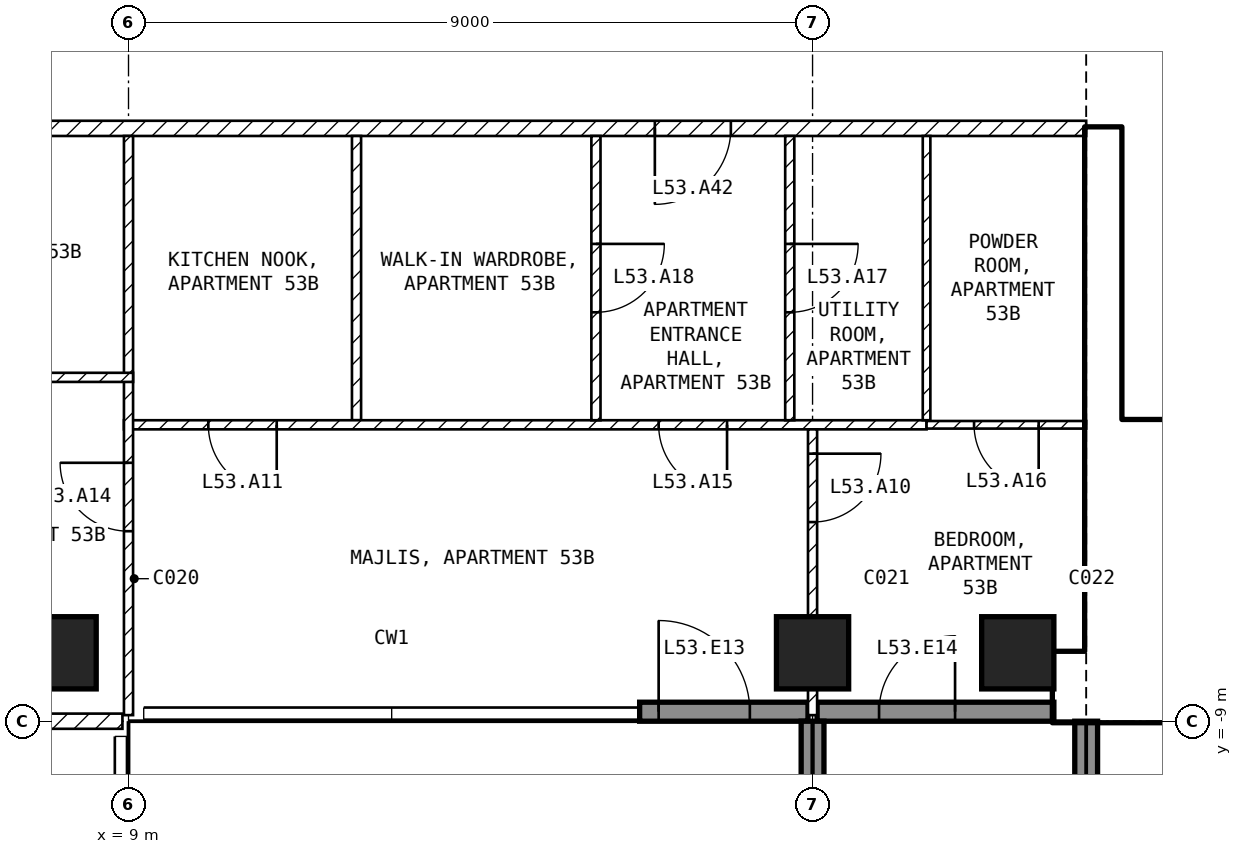
"""IFC4 building model, lengths in metres.
Left out: names, types, materials, properties, quantities, classifications, styles, units other than length and angle.
Written with IfcOpenShell. Run it as: python <this file> out.ifc"""

import sys

from ifc_helpers import new_model, si_unit, direction, frame, frame_2d, origin, origin_2d, place, context, subcontext, project, spatial, rectangle, extrude, element, fill, save


model = new_model("IFC4")
c1 = context("Model", 3, precision=1e-05, world=origin(), true_north=direction((0.0, 1.0)))
c2 = subcontext(c1, "Body", "Model", "MODEL_VIEW")
j1 = project(units=[si_unit("LENGTHUNIT", "METRE"), si_unit("PLANEANGLEUNIT", "RADIAN")], contexts=[c1])
p1 = place(None, origin())
s1 = spatial("IfcSite", under=j1, at=p1, CompositionType="ELEMENT")
p2 = place(p1, origin())
s2 = spatial("IfcBuilding", under=s1, at=p2, CompositionType="ELEMENT")
p3 = place(p2, frame((0.0, 0.0, 212.1)))
s3 = spatial("IfcBuildingStorey", under=s2, at=p3, CompositionType="ELEMENT", Elevation=212.1)
for number, where, z_axis, x_axis in (
    (1, (8.1, -8.1, -0.25), (0.0, 0.0, 1.0), (1.0, 0.0, 0.0)),
    (2, (18.0, -8.1, -0.25), (0.0, 0.0, 1.0), (1.0, 0.0, 0.0)),
    (3, (20.7, -8.1, -0.25), (0.0, 0.0, 1.0), (1.0, 0.0, 0.0)),
):
    element("IfcColumn", number, at=place(p3, frame(where, z_axis=z_axis, x_axis=x_axis)), inside=s3, PredefinedType="COLUMN", context=c2, shape_type="SweptSolid", body=[
        extrude(rectangle(XDim=0.95, YDim=0.95, at=origin_2d()), origin(), (0.0, 0.0, 1.0), 3.5),
    ])
p4 = place(p3, frame((15.725, -8.875, 0.0), z_axis=(0.0, 0.0, 1.0), x_axis=(1.0, 0.0, 0.0)))
e4 = element("IfcWall", 4, at=p4, inside=s3, PredefinedType="SOLIDWALL", context=c2, shape_type="SweptSolid", body=[
    extrude(rectangle(XDim=2.215, YDim=0.25, at=frame_2d((1.107, 0.0))), origin(), (0.0, 0.0, 1.0), 3.25),
])
p5 = place(p4, frame((0.25, 0.0, 0.0)))
e5 = element("IfcOpeningElement", 5, at=p5, cuts=e4, PredefinedType="OPENING", context=c2, shape_type="SweptSolid", body=[
    extrude(rectangle(XDim=1.2, YDim=2.4, at=frame_2d((0.6, 1.2))), frame((0.0, 0.135, 0.0), z_axis=(0.0, -1.0, 0.0), x_axis=(1.0, 0.0, 0.0)), (0.0, 0.0, 1.0), 0.27),
])
p6 = place(p3, frame((18.06, -8.875, 0.0), z_axis=(0.0, 0.0, 1.0), x_axis=(1.0, 0.0, 0.0)))
e6 = element("IfcWall", 6, at=p6, inside=s3, PredefinedType="SOLIDWALL", context=c2, shape_type="SweptSolid", body=[
    extrude(rectangle(XDim=3.115, YDim=0.25, at=frame_2d((1.558, 0.0))), origin(), (0.0, 0.0, 1.0), 3.25),
])
p7 = place(p6, frame((0.815, 0.0, 0.0)))
e7 = element("IfcOpeningElement", 7, at=p7, cuts=e6, PredefinedType="OPENING", context=c2, shape_type="SweptSolid", body=[
    extrude(rectangle(XDim=1.0, YDim=2.4, at=frame_2d((0.5, 1.2))), frame((0.0, 0.135, 0.0), z_axis=(0.0, -1.0, 0.0), x_axis=(1.0, 0.0, 0.0)), (0.0, 0.0, 1.0), 0.27),
])
for number, where, z_axis, x_axis in (
    (8, (18.0, -9.0, 0.0), (0.0, 0.0, 1.0), (0.0, -1.0, 0.0)),
    (9, (21.6, -9.0, 0.0), (0.0, 0.0, 1.0), (0.0, -1.0, 0.0)),
):
    element("IfcWall", number, at=place(p3, frame(where, z_axis=z_axis, x_axis=x_axis)), inside=s3, PredefinedType="SOLIDWALL", context=c2, shape_type="SweptSolid", body=[
        extrude(rectangle(XDim=2.7, YDim=0.3, at=frame_2d((1.35, 0.0))), origin(), (0.0, 0.0, 1.0), 3.25),
    ])
p8 = place(p3, frame((21.175, -8.55, 0.0), z_axis=(0.0, 0.0, 1.0), x_axis=(1.0, 0.0, 0.0)))
e10 = element("IfcWall", 10, at=p8, inside=s3, PredefinedType="SHEAR", context=c2, shape_type="SweptSolid", body=[
    extrude(rectangle(XDim=9.025, YDim=0.9, at=frame_2d((4.512, 0.0))), origin(), (0.0, 0.0, 1.0), 3.25),
])
p9 = place(p3, frame((21.825, -8.1, 0.0), z_axis=(0.0, 0.0, 1.0), x_axis=(0.0, 1.0, 0.0)))
e11 = element("IfcWall", 11, at=p9, inside=s3, PredefinedType="SHEAR", context=c2, shape_type="SweptSolid", body=[
    extrude(rectangle(XDim=6.9, YDim=0.45, at=frame_2d((3.45, 0.0))), origin(), (0.0, 0.0, 1.0), 3.25),
])
p10 = place(p3, frame((22.05, -5.15, 0.0), z_axis=(0.0, 0.0, 1.0), x_axis=(1.0, 0.0, 0.0)))
e12 = element("IfcWall", 12, at=p10, inside=s3, PredefinedType="SOLIDWALL", context=c2, shape_type="SweptSolid", body=[
    extrude(rectangle(XDim=6.3, YDim=0.2, at=frame_2d((3.15, 0.0))), origin(), (0.0, 0.0, 1.0), 3.25),
])
p11 = place(p10, frame((0.2, 0.0, 0.0)))
e13 = element("IfcOpeningElement", 13, at=p11, cuts=e12, PredefinedType="OPENING", context=c2, shape_type="SweptSolid", body=[
    extrude(rectangle(XDim=1.0, YDim=2.1, at=frame_2d((0.5, 1.05))), frame((0.0, 0.11, 0.0), z_axis=(0.0, -1.0, 0.0), x_axis=(1.0, 0.0, 0.0)), (0.0, 0.0, 1.0), 0.22),
])
p12 = place(p3, frame((21.6, -1.2, 0.0), z_axis=(0.0, 0.0, 1.0), x_axis=(-1.0, 0.0, 0.0)))
e14 = element("IfcWall", 14, at=p12, inside=s3, PredefinedType="PARTITIONING", context=c2, shape_type="SweptSolid", body=[
    extrude(rectangle(XDim=17.2, YDim=0.2, at=frame_2d((8.6, 0.0))), origin(), (0.0, 0.0, 1.0), 3.25),
])
p13 = place(p12, frame((4.675, 0.0, 0.0)))
e15 = element("IfcOpeningElement", 15, at=p13, cuts=e14, PredefinedType="OPENING", context=c2, shape_type="SweptSolid", body=[
    extrude(rectangle(XDim=1.0, YDim=2.1, at=frame_2d((0.5, 1.05))), frame((0.0, 0.11, 0.0), z_axis=(0.0, -1.0, 0.0), x_axis=(1.0, 0.0, 0.0)), (0.0, 0.0, 1.0), 0.22),
])
p14 = place(p3, frame((8.92, -9.0, 0.0), z_axis=(0.0, 0.0, 1.0), x_axis=(-1.0, 0.0, 0.0)))
e16 = element("IfcWall", 16, at=p14, inside=s3, PredefinedType="PARTITIONING", context=c2, shape_type="SweptSolid", body=[
    extrude(rectangle(XDim=17.84, YDim=0.2, at=frame_2d((8.92, 0.0))), origin(), (0.0, 0.0, 1.0), 3.25),
])
p15 = place(p14, frame((8.42, 0.0, 0.0)))
e17 = element("IfcOpeningElement", 17, at=p15, cuts=e16, PredefinedType="OPENING", context=c2, shape_type="SweptSolid", body=[
    extrude(rectangle(XDim=1.0, YDim=2.1, at=frame_2d((0.5, 1.05))), frame((0.0, 0.11, 0.0), z_axis=(0.0, -1.0, 0.0), x_axis=(1.0, 0.0, 0.0)), (0.0, 0.0, 1.0), 0.22),
])
p16 = place(p3, frame((12.0, -1.3, 0.0), z_axis=(0.0, 0.0, 1.0), x_axis=(0.0, -1.0, 0.0)))
e18 = element("IfcWall", 18, at=p16, inside=s3, PredefinedType="PARTITIONING", context=c2, shape_type="SweptSolid", body=[
    extrude(rectangle(XDim=3.74, YDim=0.12, at=frame_2d((1.87, 0.0))), origin(), (0.0, 0.0, 1.0), 3.25),
])
p17 = place(p3, frame((19.5, -5.1, 0.0), z_axis=(0.0, 0.0, 1.0), x_axis=(-1.0, 0.0, 0.0)))
e19 = element("IfcWall", 19, at=p17, inside=s3, PredefinedType="PARTITIONING", context=c2, shape_type="SweptSolid", body=[
    extrude(rectangle(XDim=10.56, YDim=0.12, at=frame_2d((5.28, 0.0))), origin(), (0.0, 0.0, 1.0), 3.25),
])
p18 = place(p17, frame((8.55, 0.0, 0.0)))
e20 = element("IfcOpeningElement", 20, at=p18, cuts=e19, PredefinedType="OPENING", context=c2, shape_type="SweptSolid", body=[
    extrude(rectangle(XDim=0.9, YDim=2.1, at=frame_2d((0.45, 1.05))), frame((0.0, 0.07, 0.0), z_axis=(0.0, -1.0, 0.0), x_axis=(1.0, 0.0, 0.0)), (0.0, 0.0, 1.0), 0.14),
])
p19 = place(p17, frame((2.625, 0.0, 0.0)))
e21 = element("IfcOpeningElement", 21, at=p19, cuts=e19, PredefinedType="OPENING", context=c2, shape_type="SweptSolid", body=[
    extrude(rectangle(XDim=0.9, YDim=2.1, at=frame_2d((0.45, 1.05))), frame((0.0, 0.07, 0.0), z_axis=(0.0, -1.0, 0.0), x_axis=(1.0, 0.0, 0.0)), (0.0, 0.0, 1.0), 0.14),
])
p20 = place(p3, frame((9.0, -8.92, 0.0), z_axis=(0.0, 0.0, 1.0), x_axis=(0.0, 1.0, 0.0)))
e22 = element("IfcWall", 22, at=p20, inside=s3, PredefinedType="PARTITIONING", context=c2, shape_type="SweptSolid", body=[
    extrude(rectangle(XDim=7.62, YDim=0.12, at=frame_2d((3.81, 0.0))), origin(), (0.0, 0.0, 1.0), 3.25),
])
p21 = place(p20, frame((2.42, 0.0, 0.0)))
e23 = element("IfcOpeningElement", 23, at=p21, cuts=e22, PredefinedType="OPENING", context=c2, shape_type="SweptSolid", body=[
    extrude(rectangle(XDim=0.9, YDim=2.1, at=frame_2d((0.45, 1.05))), frame((0.0, 0.07, 0.0), z_axis=(0.0, -1.0, 0.0), x_axis=(1.0, 0.0, 0.0)), (0.0, 0.0, 1.0), 0.14),
])
p22 = place(p3, frame((15.15, -1.3, 0.0), z_axis=(0.0, 0.0, 1.0), x_axis=(0.0, -1.0, 0.0)))
e24 = element("IfcWall", 24, at=p22, inside=s3, PredefinedType="PARTITIONING", context=c2, shape_type="SweptSolid", body=[
    extrude(rectangle(XDim=3.74, YDim=0.12, at=frame_2d((1.87, 0.0))), origin(), (0.0, 0.0, 1.0), 3.25),
])
p23 = place(p22, frame((1.42, 0.0, 0.0)))
e25 = element("IfcOpeningElement", 25, at=p23, cuts=e24, PredefinedType="OPENING", context=c2, shape_type="SweptSolid", body=[
    extrude(rectangle(XDim=0.9, YDim=2.1, at=frame_2d((0.45, 1.05))), frame((0.0, 0.07, 0.0), z_axis=(0.0, -1.0, 0.0), x_axis=(1.0, 0.0, 0.0)), (0.0, 0.0, 1.0), 0.14),
])
p24 = place(p3, frame((17.7, -1.3, 0.0), z_axis=(0.0, 0.0, 1.0), x_axis=(0.0, -1.0, 0.0)))
e26 = element("IfcWall", 26, at=p24, inside=s3, PredefinedType="PARTITIONING", context=c2, shape_type="SweptSolid", body=[
    extrude(rectangle(XDim=3.74, YDim=0.12, at=frame_2d((1.87, 0.0))), origin(), (0.0, 0.0, 1.0), 3.25),
])
p25 = place(p24, frame((1.42, 0.0, 0.0)))
e27 = element("IfcOpeningElement", 27, at=p25, cuts=e26, PredefinedType="OPENING", context=c2, shape_type="SweptSolid", body=[
    extrude(rectangle(XDim=0.9, YDim=2.1, at=frame_2d((0.45, 1.05))), frame((0.0, 0.07, 0.0), z_axis=(0.0, -1.0, 0.0), x_axis=(1.0, 0.0, 0.0)), (0.0, 0.0, 1.0), 0.14),
])
p26 = place(p3, frame((19.5, -1.3, 0.0), z_axis=(0.0, 0.0, 1.0), x_axis=(0.0, -1.0, 0.0)))
e28 = element("IfcWall", 28, at=p26, inside=s3, PredefinedType="PARTITIONING", context=c2, shape_type="SweptSolid", body=[
    extrude(rectangle(XDim=3.74, YDim=0.1, at=frame_2d((1.87, 0.0))), origin(), (0.0, 0.0, 1.0), 3.25),
])
p27 = place(p3, frame((21.6, -5.1, 0.0), z_axis=(0.0, 0.0, 1.0), x_axis=(-1.0, 0.0, 0.0)))
e29 = element("IfcWall", 29, at=p27, inside=s3, PredefinedType="PARTITIONING", context=c2, shape_type="SweptSolid", body=[
    extrude(rectangle(XDim=2.1, YDim=0.1, at=frame_2d((1.05, 0.0))), origin(), (0.0, 0.0, 1.0), 3.25),
])
p28 = place(p27, frame((0.625, 0.0, 0.0)))
e30 = element("IfcOpeningElement", 30, at=p28, cuts=e29, PredefinedType="OPENING", context=c2, shape_type="SweptSolid", body=[
    extrude(rectangle(XDim=0.85, YDim=2.1, at=frame_2d((0.425, 1.05))), frame((0.0, 0.06, 0.0), z_axis=(0.0, -1.0, 0.0), x_axis=(1.0, 0.0, 0.0)), (0.0, 0.0, 1.0), 0.12),
])
p29 = place(p3, frame((18.0, -5.16, 0.0), z_axis=(0.0, 0.0, 1.0), x_axis=(0.0, -1.0, 0.0)))
e31 = element("IfcWall", 31, at=p29, inside=s3, PredefinedType="PARTITIONING", context=c2, shape_type="SweptSolid", body=[
    extrude(rectangle(XDim=3.76, YDim=0.12, at=frame_2d((1.88, 0.0))), origin(), (0.0, 0.0, 1.0), 2.48),
])
p30 = place(p29, frame((0.32, 0.0, 0.0)))
e32 = element("IfcOpeningElement", 32, at=p30, cuts=e31, PredefinedType="OPENING", context=c2, shape_type="SweptSolid", body=[
    extrude(rectangle(XDim=0.9, YDim=2.1, at=frame_2d((0.45, 1.05))), frame((0.0, 0.07, 0.0), z_axis=(0.0, -1.0, 0.0), x_axis=(1.0, 0.0, 0.0)), (0.0, 0.0, 1.0), 0.14),
])
p31 = place(p3, frame((9.06, -4.476, 0.0), z_axis=(0.0, 0.0, 1.0), x_axis=(-1.0, 0.0, 0.0)))
e33 = element("IfcWall", 33, at=p31, inside=s3, PredefinedType="PARTITIONING", context=c2, shape_type="SweptSolid", body=[
    extrude(rectangle(XDim=4.66, YDim=0.12, at=frame_2d((2.33, 0.0))), origin(), (0.0, 0.0, 1.0), 3.25),
])
p32 = place(p31, frame((1.86, 0.0, 0.0)))
e34 = element("IfcOpeningElement", 34, at=p32, cuts=e33, PredefinedType="OPENING", context=c2, shape_type="SweptSolid", body=[
    extrude(rectangle(XDim=0.9, YDim=2.1, at=frame_2d((0.45, 1.05))), frame((0.0, 0.07, 0.0), z_axis=(0.0, -1.0, 0.0), x_axis=(1.0, 0.0, 0.0)), (0.0, 0.0, 1.0), 0.14),
])
p33 = place(p5, origin())
e35 = element("IfcDoor", 35, at=p33, inside=s3, OperationType="SINGLE_SWING_LEFT", PredefinedType="DOOR", context=c2, shape_type="SweptSolid", body=[
    extrude(rectangle(XDim=1.2, YDim=2.4, at=frame_2d((0.6, 1.2))), frame((0.0, 0.025, 0.0), z_axis=(0.0, -1.0, 0.0), x_axis=(1.0, 0.0, 0.0)), (0.0, 0.0, 1.0), 0.05),
])
fill(e5, e35)
p34 = place(p7, origin())
e36 = element("IfcDoor", 36, at=p34, inside=s3, OperationType="SINGLE_SWING_RIGHT", PredefinedType="DOOR", context=c2, shape_type="SweptSolid", body=[
    extrude(rectangle(XDim=1.0, YDim=2.4, at=frame_2d((0.5, 1.2))), frame((0.0, 0.025, 0.0), z_axis=(0.0, -1.0, 0.0), x_axis=(1.0, 0.0, 0.0)), (0.0, 0.0, 1.0), 0.05),
])
fill(e7, e36)
p35 = place(p11, origin())
e37 = element("IfcDoor", 37, at=p35, inside=s3, OperationType="SINGLE_SWING_LEFT", PredefinedType="DOOR", context=c2, shape_type="SweptSolid", body=[
    extrude(rectangle(XDim=1.0, YDim=2.1, at=frame_2d((0.5, 1.05))), frame((0.0, 0.025, 0.0), z_axis=(0.0, -1.0, 0.0), x_axis=(1.0, 0.0, 0.0)), (0.0, 0.0, 1.0), 0.05),
])
fill(e13, e37)
p36 = place(p30, origin())
e38 = element("IfcDoor", 38, at=p36, inside=s3, OperationType="SINGLE_SWING_LEFT", PredefinedType="DOOR", context=c2, shape_type="SweptSolid", body=[
    extrude(rectangle(XDim=0.9, YDim=2.1, at=frame_2d((0.45, 1.05))), frame((0.0, 0.025, 0.0), z_axis=(0.0, -1.0, 0.0), x_axis=(1.0, 0.0, 0.0)), (0.0, 0.0, 1.0), 0.05),
])
fill(e32, e38)
p37 = place(p18, origin())
e39 = element("IfcDoor", 39, at=p37, inside=s3, OperationType="SINGLE_SWING_LEFT", PredefinedType="DOOR", context=c2, shape_type="SweptSolid", body=[
    extrude(rectangle(XDim=0.9, YDim=2.1, at=frame_2d((0.45, 1.05))), frame((0.0, 0.025, 0.0), z_axis=(0.0, -1.0, 0.0), x_axis=(1.0, 0.0, 0.0)), (0.0, 0.0, 1.0), 0.05),
])
fill(e20, e39)
p38 = place(p21, origin())
e40 = element("IfcDoor", 40, at=p38, inside=s3, OperationType="SINGLE_SWING_RIGHT", PredefinedType="DOOR", context=c2, shape_type="SweptSolid", body=[
    extrude(rectangle(XDim=0.9, YDim=2.1, at=frame_2d((0.45, 1.05))), frame((0.0, 0.025, 0.0), z_axis=(0.0, -1.0, 0.0), x_axis=(1.0, 0.0, 0.0)), (0.0, 0.0, 1.0), 0.05),
])
fill(e23, e40)
p39 = place(p19, origin())
e41 = element("IfcDoor", 41, at=p39, inside=s3, OperationType="SINGLE_SWING_LEFT", PredefinedType="DOOR", context=c2, shape_type="SweptSolid", body=[
    extrude(rectangle(XDim=0.9, YDim=2.1, at=frame_2d((0.45, 1.05))), frame((0.0, 0.025, 0.0), z_axis=(0.0, -1.0, 0.0), x_axis=(1.0, 0.0, 0.0)), (0.0, 0.0, 1.0), 0.05),
])
fill(e21, e41)
p40 = place(p28, origin())
e42 = element("IfcDoor", 42, at=p40, inside=s3, OperationType="SINGLE_SWING_LEFT", PredefinedType="DOOR", context=c2, shape_type="SweptSolid", body=[
    extrude(rectangle(XDim=0.85, YDim=2.1, at=frame_2d((0.425, 1.05))), frame((0.0, 0.025, 0.0), z_axis=(0.0, -1.0, 0.0), x_axis=(1.0, 0.0, 0.0)), (0.0, 0.0, 1.0), 0.05),
])
fill(e30, e42)
p41 = place(p25, origin())
e43 = element("IfcDoor", 43, at=p41, inside=s3, OperationType="SINGLE_SWING_LEFT", PredefinedType="DOOR", context=c2, shape_type="SweptSolid", body=[
    extrude(rectangle(XDim=0.9, YDim=2.1, at=frame_2d((0.45, 1.05))), frame((0.0, 0.025, 0.0), z_axis=(0.0, -1.0, 0.0), x_axis=(1.0, 0.0, 0.0)), (0.0, 0.0, 1.0), 0.05),
])
fill(e27, e43)
p42 = place(p23, origin())
e44 = element("IfcDoor", 44, at=p42, inside=s3, OperationType="SINGLE_SWING_LEFT", PredefinedType="DOOR", context=c2, shape_type="SweptSolid", body=[
    extrude(rectangle(XDim=0.9, YDim=2.1, at=frame_2d((0.45, 1.05))), frame((0.0, 0.025, 0.0), z_axis=(0.0, -1.0, 0.0), x_axis=(1.0, 0.0, 0.0)), (0.0, 0.0, 1.0), 0.05),
])
fill(e25, e44)
p43 = place(p13, origin())
e45 = element("IfcDoor", 45, at=p43, inside=s3, OperationType="SINGLE_SWING_RIGHT", PredefinedType="DOOR", context=c2, shape_type="SweptSolid", body=[
    extrude(rectangle(XDim=1.0, YDim=2.1, at=frame_2d((0.5, 1.05))), frame((0.0, 0.025, 0.0), z_axis=(0.0, -1.0, 0.0), x_axis=(1.0, 0.0, 0.0)), (0.0, 0.0, 1.0), 0.05),
])
fill(e15, e45)
save(model, sys.argv[1])
